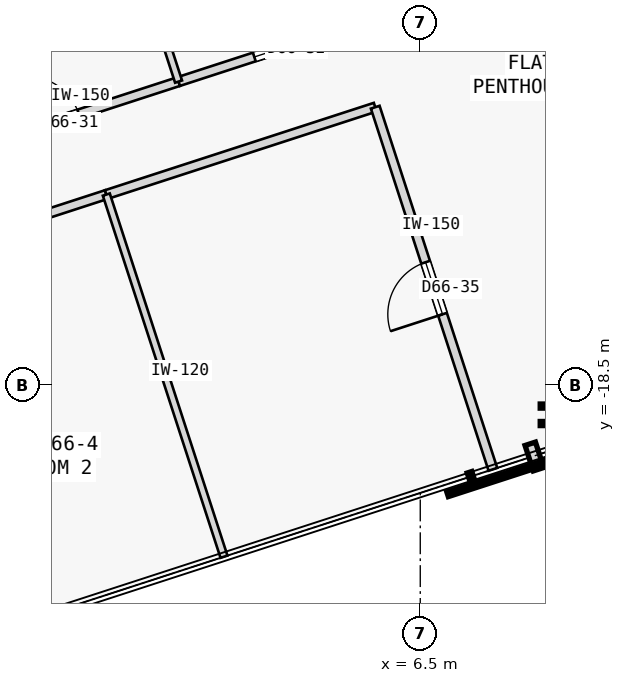
"""IFC4 building model, lengths in metres.
Left out: names, types, materials, properties, quantities, classifications, styles, units other than length and angle.
Written with IfcOpenShell. Run it as: python <this file> out.ifc"""

import sys

from ifc_helpers import new_model, si_unit, direction, frame, frame_2d, origin, origin_2d, place, context, subcontext, project, spatial, rectangle, i_section, extrude, element, fill, save


model = new_model("IFC4")
c1 = context("Model", 3, precision=1e-05, world=origin(), true_north=direction((0.0, 1.0)))
c2 = subcontext(c1, "Body", "Model", "MODEL_VIEW")
j1 = project(units=[si_unit("LENGTHUNIT", "METRE"), si_unit("PLANEANGLEUNIT", "RADIAN")], contexts=[c1])
p1 = place(None, origin())
s1 = spatial("IfcSite", under=j1, at=p1, CompositionType="ELEMENT")
p2 = place(p1, origin())
s2 = spatial("IfcBuilding", under=s1, at=p2, CompositionType="ELEMENT")
p3 = place(p2, frame((0.0, 0.0, 247.75)))
s3 = spatial("IfcBuildingStorey", under=s2, at=p3, CompositionType="ELEMENT", Elevation=247.75)
p4 = place(p3, frame((8.675, -18.988, 0.0), z_axis=(0.0, 0.0, 1.0), x_axis=(1.0, 0.0, 0.0)))
e1 = element("IfcColumn", 1, at=p4, inside=s3, PredefinedType="COLUMN", context=c2, shape_type="SweptSolid", body=[
    extrude(i_section(OverallWidth=0.405, OverallDepth=0.355, WebThickness=0.042, FlangeThickness=0.068, FilletRadius=0.015, at=origin_2d()), origin(), (0.0, 0.0, 1.0), 3.35),
])
p5 = place(p3, frame((-1.612, -14.852, 0.0), z_axis=(0.0, 0.0, 1.0), x_axis=(0.951074479912, 0.30896170258, 0.0)))
e2 = element("IfcWall", 2, at=p5, inside=s3, PredefinedType="PARTITIONING", context=c2, shape_type="SweptSolid", body=[
    extrude(rectangle(XDim=4.35, YDim=0.15, at=frame_2d((2.175, 0.0))), origin(), (0.0, 0.0, 1.0), 3.125),
])
p6 = place(p5, frame((1.725, 0.0, 0.0)))
e3 = element("IfcOpeningElement", 3, at=p6, cuts=e2, PredefinedType="OPENING", context=c2, shape_type="SweptSolid", body=[
    extrude(rectangle(XDim=0.9, YDim=2.15, at=frame_2d((0.45, 1.075))), frame((0.0, 0.085, 0.0), z_axis=(0.0, -1.0, 0.0), x_axis=(1.0, 0.0, 0.0)), (0.0, 0.0, 1.0), 0.17),
])
p7 = place(p3, frame((2.525, -13.508, 0.0), z_axis=(0.0, 0.0, 1.0), x_axis=(0.95103509395, 0.3090829178, 0.0)))
e4 = element("IfcWall", 4, at=p7, inside=s3, PredefinedType="PARTITIONING", context=c2, shape_type="SweptSolid", body=[
    extrude(rectangle(XDim=3.5, YDim=0.15, at=frame_2d((1.75, 0.0))), origin(), (0.0, 0.0, 1.0), 3.125),
])
p8 = place(p7, frame((1.31, 0.0, 0.0)))
e5 = element("IfcOpeningElement", 5, at=p8, cuts=e4, PredefinedType="OPENING", context=c2, shape_type="SweptSolid", body=[
    extrude(rectangle(XDim=0.88, YDim=2.15, at=frame_2d((0.44, 1.075))), frame((0.0, 0.085, 0.0), z_axis=(0.0, -1.0, 0.0), x_axis=(1.0, 0.0, 0.0)), (0.0, 0.0, 1.0), 0.17),
])
p9 = place(p3, frame((-3.085, -16.803, 0.0), z_axis=(0.0, 0.0, 1.0), x_axis=(0.951050272606, 0.309036209813, 0.0)))
e6 = element("IfcWall", 6, at=p9, inside=s3, PredefinedType="PARTITIONING", context=c2, shape_type="SweptSolid", body=[
    extrude(rectangle(XDim=4.65, YDim=0.15, at=frame_2d((2.325, 0.0))), origin(), (0.0, 0.0, 1.0), 3.125),
])
p10 = place(p9, frame((1.875, 0.0, 0.0)))
e7 = element("IfcOpeningElement", 7, at=p10, cuts=e6, PredefinedType="OPENING", context=c2, shape_type="SweptSolid", body=[
    extrude(rectangle(XDim=0.9, YDim=2.15, at=frame_2d((0.45, 1.075))), frame((0.0, 0.085, 0.0), z_axis=(0.0, -1.0, 0.0), x_axis=(1.0, 0.0, 0.0)), (0.0, 0.0, 1.0), 0.17),
])
p11 = place(p3, frame((1.337, -15.366, 0.0), z_axis=(0.0, 0.0, 1.0), x_axis=(0.951050272606, 0.309036209813, 0.0)))
e8 = element("IfcWall", 8, at=p11, inside=s3, PredefinedType="PARTITIONING", context=c2, shape_type="SweptSolid", body=[
    extrude(rectangle(XDim=4.65, YDim=0.15, at=frame_2d((2.325, 0.0))), origin(), (0.0, 0.0, 1.0), 3.125),
])
p12 = place(p3, frame((7.695, -19.884, 0.0), z_axis=(0.0, 0.0, 1.0), x_axis=(-0.309013782848, 0.951057559777, 0.0)))
e9 = element("IfcWall", 9, at=p12, inside=s3, PredefinedType="PARTITIONING", context=c2, shape_type="SweptSolid", body=[
    extrude(rectangle(XDim=6.262, YDim=0.15, at=frame_2d((3.131, 0.0))), origin(), (0.0, 0.0, 1.0), 3.125),
])
p13 = place(p12, frame((2.681, 0.0, 0.0)))
e10 = element("IfcOpeningElement", 10, at=p13, cuts=e9, PredefinedType="OPENING", context=c2, shape_type="SweptSolid", body=[
    extrude(rectangle(XDim=0.9, YDim=2.15, at=frame_2d((0.45, 1.075))), frame((0.0, 0.085, 0.0), z_axis=(0.0, -1.0, 0.0), x_axis=(1.0, 0.0, 0.0)), (0.0, 0.0, 1.0), 0.17),
])
p14 = place(p3, frame((2.525, -13.508, 0.0), z_axis=(0.0, 0.0, 1.0), x_axis=(-0.309028364152, 0.951052821956, 0.0)))
e11 = element("IfcWall", 11, at=p14, inside=s3, PredefinedType="PARTITIONING", context=c2, shape_type="SweptSolid", body=[
    extrude(rectangle(XDim=2.2, YDim=0.12, at=frame_2d((1.1, 0.0))), origin(), (0.0, 0.0, 1.0), 3.125),
])
p15 = place(p3, frame((3.272, -21.321, 0.0), z_axis=(0.0, 0.0, 1.0), x_axis=(-0.309013782848, 0.951057559777, 0.0)))
e12 = element("IfcWall", 12, at=p15, inside=s3, PredefinedType="PARTITIONING", context=c2, shape_type="SweptSolid", body=[
    extrude(rectangle(XDim=6.262, YDim=0.12, at=frame_2d((3.131, 0.0))), origin(), (0.0, 0.0, 1.0), 3.125),
])
p16 = place(p6, origin())
e13 = element("IfcDoor", 13, at=p16, inside=s3, OperationType="SINGLE_SWING_LEFT", PredefinedType="DOOR", context=c2, shape_type="SweptSolid", body=[
    extrude(rectangle(XDim=0.9, YDim=2.15, at=frame_2d((0.45, 1.075))), frame((0.0, 0.025, 0.0), z_axis=(0.0, -1.0, 0.0), x_axis=(1.0, 0.0, 0.0)), (0.0, 0.0, 1.0), 0.05),
])
fill(e3, e13)
p17 = place(p8, origin())
e14 = element("IfcDoor", 14, at=p17, inside=s3, OperationType="SINGLE_SWING_RIGHT", PredefinedType="DOOR", context=c2, shape_type="SweptSolid", body=[
    extrude(rectangle(XDim=0.88, YDim=2.15, at=frame_2d((0.44, 1.075))), frame((0.0, 0.025, 0.0), z_axis=(0.0, -1.0, 0.0), x_axis=(1.0, 0.0, 0.0)), (0.0, 0.0, 1.0), 0.05),
])
fill(e5, e14)
p18 = place(p13, origin())
e15 = element("IfcDoor", 15, at=p18, inside=s3, OperationType="SINGLE_SWING_LEFT", PredefinedType="DOOR", context=c2, shape_type="SweptSolid", body=[
    extrude(rectangle(XDim=0.9, YDim=2.15, at=frame_2d((0.45, 1.075))), frame((0.0, 0.025, 0.0), z_axis=(0.0, -1.0, 0.0), x_axis=(1.0, 0.0, 0.0)), (0.0, 0.0, 1.0), 0.05),
])
fill(e10, e15)
save(model, sys.argv[1])
